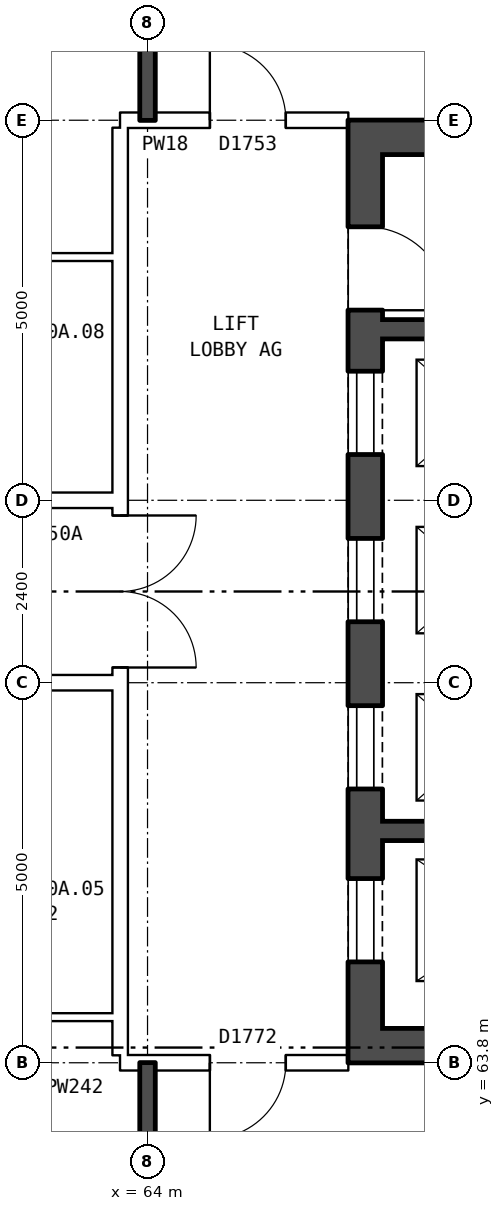
"""IFC4 building model, lengths in metres.
Left out: names, types, materials, properties, quantities, classifications, styles, units other than length and angle.
Written with IfcOpenShell. Run it as: python <this file> out.ifc"""

import sys

from ifc_helpers import new_model, si_unit, direction, frame, frame_2d, origin, place, context, subcontext, project, spatial, rectangle, extrude, element, fill, save


model = new_model("IFC4")
c1 = context("Model", 3, precision=1e-05, world=origin(), true_north=direction((0.0, 1.0)))
c2 = subcontext(c1, "Body", "Model", "MODEL_VIEW")
j1 = project(units=[si_unit("LENGTHUNIT", "METRE"), si_unit("PLANEANGLEUNIT", "RADIAN")], contexts=[c1])
p1 = place(None, origin())
s1 = spatial("IfcSite", under=j1, at=p1, CompositionType="ELEMENT")
p2 = place(p1, origin())
s2 = spatial("IfcBuilding", under=s1, at=p2, CompositionType="ELEMENT")
p3 = place(p2, frame((0.0, 0.0, 178.9)))
s3 = spatial("IfcBuildingStorey", under=s2, at=p3, CompositionType="ELEMENT", Elevation=178.9)
p4 = place(p3, frame((66.865, 63.8, 0.0), z_axis=(0.0, 0.0, 1.0), x_axis=(0.0, 1.0, 0.0)))
e1 = element("IfcWall", 1, at=p4, inside=s3, PredefinedType="SHEAR", context=c2, shape_type="SweptSolid", body=[
    extrude(rectangle(XDim=12.4, YDim=0.45, at=frame_2d((6.2, 0.0))), origin(), (0.0, 0.0, 1.0), 2.85),
])
p5 = place(p4, frame((1.325, 0.0, 0.0)))
e2 = element("IfcOpeningElement", 2, at=p5, cuts=e1, PredefinedType="OPENING", context=c2, shape_type="SweptSolid", body=[
    extrude(rectangle(XDim=1.1, YDim=2.1, at=frame_2d((0.55, 1.05))), frame((0.0, 0.235, 0.0), z_axis=(0.0, -1.0, 0.0), x_axis=(1.0, 0.0, 0.0)), (0.0, 0.0, 1.0), 0.47),
])
p6 = place(p4, frame((3.6, 0.0, 0.0)))
e3 = element("IfcOpeningElement", 3, at=p6, cuts=e1, PredefinedType="OPENING", context=c2, shape_type="SweptSolid", body=[
    extrude(rectangle(XDim=1.1, YDim=2.1, at=frame_2d((0.55, 1.05))), frame((0.0, 0.235, 0.0), z_axis=(0.0, -1.0, 0.0), x_axis=(1.0, 0.0, 0.0)), (0.0, 0.0, 1.0), 0.47),
])
p7 = place(p4, frame((5.8, 0.0, 0.0)))
e4 = element("IfcOpeningElement", 4, at=p7, cuts=e1, PredefinedType="OPENING", context=c2, shape_type="SweptSolid", body=[
    extrude(rectangle(XDim=1.1, YDim=2.1, at=frame_2d((0.55, 1.05))), frame((0.0, 0.235, 0.0), z_axis=(0.0, -1.0, 0.0), x_axis=(1.0, 0.0, 0.0)), (0.0, 0.0, 1.0), 0.47),
])
p8 = place(p4, frame((8.0, 0.0, 0.0)))
e5 = element("IfcOpeningElement", 5, at=p8, cuts=e1, PredefinedType="OPENING", context=c2, shape_type="SweptSolid", body=[
    extrude(rectangle(XDim=1.1, YDim=2.1, at=frame_2d((0.55, 1.05))), frame((0.0, 0.235, 0.0), z_axis=(0.0, -1.0, 0.0), x_axis=(1.0, 0.0, 0.0)), (0.0, 0.0, 1.0), 0.47),
])
p9 = place(p4, frame((9.9, 0.0, 0.0)))
e6 = element("IfcOpeningElement", 6, at=p9, cuts=e1, PredefinedType="OPENING", context=c2, shape_type="SweptSolid", body=[
    extrude(rectangle(XDim=1.1, YDim=2.1, at=frame_2d((0.55, 1.05))), frame((0.0, 0.235, 0.0), z_axis=(0.0, -1.0, 0.0), x_axis=(1.0, 0.0, 0.0)), (0.0, 0.0, 1.0), 0.47),
])
for number, where, z_axis, x_axis in (
    (7, (67.09, 64.025, 0.0), (0.0, 0.0, 1.0), (1.0, 0.0, 0.0)),
    (8, (67.09, 75.975, 0.0), (0.0, 0.0, 1.0), (1.0, 0.0, 0.0)),
):
    element("IfcWall", number, at=place(p3, frame(where, z_axis=z_axis, x_axis=x_axis)), inside=s3, PredefinedType="SHEAR", context=c2, shape_type="SweptSolid", body=[
        extrude(rectangle(XDim=8.1, YDim=0.45, at=frame_2d((4.05, 0.0))), origin(), (0.0, 0.0, 1.0), 2.85),
    ])
p10 = place(p3, frame((67.09, 66.85, 0.0), z_axis=(0.0, 0.0, 1.0), x_axis=(1.0, 0.0, 0.0)))
e9 = element("IfcWall", 9, at=p10, inside=s3, PredefinedType="SHEAR", context=c2, shape_type="SweptSolid", body=[
    extrude(rectangle(XDim=3.545, YDim=0.25, at=frame_2d((1.772, 0.0))), origin(), (0.0, 0.0, 1.0), 2.85),
])
p11 = place(p3, frame((67.09, 73.45, 0.0), z_axis=(0.0, 0.0, 1.0), x_axis=(1.0, 0.0, 0.0)))
e10 = element("IfcWall", 10, at=p11, inside=s3, PredefinedType="SHEAR", context=c2, shape_type="SweptSolid", body=[
    extrude(rectangle(XDim=2.475, YDim=0.25, at=frame_2d((1.237, 0.0))), origin(), (0.0, 0.0, 1.0), 2.85),
])
p12 = place(p3, frame((63.64, 63.9, 0.0), z_axis=(0.0, 0.0, 1.0), x_axis=(0.0, 1.0, 0.0)))
e11 = element("IfcWall", 11, at=p12, inside=s3, PredefinedType="PARTITIONING", context=c2, shape_type="SweptSolid", body=[
    extrude(rectangle(XDim=12.2, YDim=0.2, at=frame_2d((6.1, 0.0))), origin(), (0.0, 0.0, 1.0), 2.85),
])
p13 = place(p12, frame((5.1, 0.0, 0.0)))
e12 = element("IfcOpeningElement", 12, at=p13, cuts=e11, PredefinedType="OPENING", context=c2, shape_type="SweptSolid", body=[
    extrude(rectangle(XDim=2.0, YDim=2.1, at=frame_2d((1.0, 1.05))), frame((0.0, 0.11, 0.0), z_axis=(0.0, -1.0, 0.0), x_axis=(1.0, 0.0, 0.0)), (0.0, 0.0, 1.0), 0.22),
])
p14 = place(p3, frame((63.64, 63.8, 0.0), z_axis=(0.0, 0.0, 1.0), x_axis=(1.0, 0.0, 0.0)))
e13 = element("IfcWall", 13, at=p14, inside=s3, PredefinedType="PARTITIONING", context=c2, shape_type="SweptSolid", body=[
    extrude(rectangle(XDim=3.0, YDim=0.2, at=frame_2d((1.5, 0.0))), origin(), (0.0, 0.0, 1.0), 2.85),
])
p15 = place(p14, frame((1.18, 0.0, 0.0)))
e14 = element("IfcOpeningElement", 14, at=p15, cuts=e13, PredefinedType="OPENING", context=c2, shape_type="SweptSolid", body=[
    extrude(rectangle(XDim=1.0, YDim=2.1, at=frame_2d((0.5, 1.05))), frame((0.0, 0.11, 0.0), z_axis=(0.0, -1.0, 0.0), x_axis=(1.0, 0.0, 0.0)), (0.0, 0.0, 1.0), 0.22),
])
p16 = place(p3, frame((61.0, 64.4, 0.0), z_axis=(0.0, 0.0, 1.0), x_axis=(1.0, 0.0, 0.0)))
e15 = element("IfcWall", 15, at=p16, inside=s3, PredefinedType="PARTITIONING", context=c2, shape_type="SweptSolid", body=[
    extrude(rectangle(XDim=2.64, YDim=0.1, at=frame_2d((1.32, 0.0))), origin(), (0.0, 0.0, 1.0), 2.85),
])
p17 = place(p3, frame((44.36, 68.8, 0.0), z_axis=(0.0, 0.0, 1.0), x_axis=(1.0, 0.0, 0.0)))
e16 = element("IfcWall", 16, at=p17, inside=s3, PredefinedType="PARTITIONING", context=c2, shape_type="SweptSolid", body=[
    extrude(rectangle(XDim=19.28, YDim=0.2, at=frame_2d((9.64, 0.0))), origin(), (0.0, 0.0, 1.0), 2.85),
])
p18 = place(p17, frame((14.64, 0.0, 0.0)))
e17 = element("IfcOpeningElement", 17, at=p18, cuts=e16, PredefinedType="OPENING", context=c2, shape_type="SweptSolid", body=[
    extrude(rectangle(XDim=1.0, YDim=2.1, at=frame_2d((0.5, 1.05))), frame((0.0, 0.11, 0.0), z_axis=(0.0, -1.0, 0.0), x_axis=(1.0, 0.0, 0.0)), (0.0, 0.0, 1.0), 0.22),
])
p19 = place(p17, frame((11.64, 0.0, 0.0)))
e18 = element("IfcOpeningElement", 18, at=p19, cuts=e16, PredefinedType="OPENING", context=c2, shape_type="SweptSolid", body=[
    extrude(rectangle(XDim=1.0, YDim=2.1, at=frame_2d((0.5, 1.05))), frame((0.0, 0.11, 0.0), z_axis=(0.0, -1.0, 0.0), x_axis=(1.0, 0.0, 0.0)), (0.0, 0.0, 1.0), 0.22),
])
p20 = place(p17, frame((5.64, 0.0, 0.0)))
e19 = element("IfcOpeningElement", 19, at=p20, cuts=e16, PredefinedType="OPENING", context=c2, shape_type="SweptSolid", body=[
    extrude(rectangle(XDim=1.0, YDim=2.1, at=frame_2d((0.5, 1.05))), frame((0.0, 0.11, 0.0), z_axis=(0.0, -1.0, 0.0), x_axis=(1.0, 0.0, 0.0)), (0.0, 0.0, 1.0), 0.22),
])
p21 = place(p3, frame((44.36, 71.2, 0.0), z_axis=(0.0, 0.0, 1.0), x_axis=(1.0, 0.0, 0.0)))
e20 = element("IfcWall", 20, at=p21, inside=s3, PredefinedType="PARTITIONING", context=c2, shape_type="SweptSolid", body=[
    extrude(rectangle(XDim=19.28, YDim=0.2, at=frame_2d((9.64, 0.0))), origin(), (0.0, 0.0, 1.0), 2.85),
])
p22 = place(p21, frame((14.64, 0.0, 0.0)))
e21 = element("IfcOpeningElement", 21, at=p22, cuts=e20, PredefinedType="OPENING", context=c2, shape_type="SweptSolid", body=[
    extrude(rectangle(XDim=1.0, YDim=2.1, at=frame_2d((0.5, 1.05))), frame((0.0, 0.11, 0.0), z_axis=(0.0, -1.0, 0.0), x_axis=(1.0, 0.0, 0.0)), (0.0, 0.0, 1.0), 0.22),
])
p23 = place(p21, frame((5.64, 0.0, 0.0)))
e22 = element("IfcOpeningElement", 22, at=p23, cuts=e20, PredefinedType="OPENING", context=c2, shape_type="SweptSolid", body=[
    extrude(rectangle(XDim=1.0, YDim=2.1, at=frame_2d((0.5, 1.05))), frame((0.0, 0.11, 0.0), z_axis=(0.0, -1.0, 0.0), x_axis=(1.0, 0.0, 0.0)), (0.0, 0.0, 1.0), 0.22),
])
p24 = place(p3, frame((61.0, 74.4, 0.0), z_axis=(0.0, 0.0, 1.0), x_axis=(1.0, 0.0, 0.0)))
e23 = element("IfcWall", 23, at=p24, inside=s3, PredefinedType="PARTITIONING", context=c2, shape_type="SweptSolid", body=[
    extrude(rectangle(XDim=2.64, YDim=0.1, at=frame_2d((1.32, 0.0))), origin(), (0.0, 0.0, 1.0), 2.85),
])
p25 = place(p3, frame((63.64, 76.2, 0.0), z_axis=(0.0, 0.0, 1.0), x_axis=(1.0, 0.0, 0.0)))
e24 = element("IfcWall", 24, at=p25, inside=s3, PredefinedType="PARTITIONING", context=c2, shape_type="SweptSolid", body=[
    extrude(rectangle(XDim=3.0, YDim=0.2, at=frame_2d((1.5, 0.0))), origin(), (0.0, 0.0, 1.0), 2.85),
])
p26 = place(p25, frame((1.18, 0.0, 0.0)))
e25 = element("IfcOpeningElement", 25, at=p26, cuts=e24, PredefinedType="OPENING", context=c2, shape_type="SweptSolid", body=[
    extrude(rectangle(XDim=1.0, YDim=2.1, at=frame_2d((0.5, 1.05))), frame((0.0, 0.11, 0.0), z_axis=(0.0, -1.0, 0.0), x_axis=(1.0, 0.0, 0.0)), (0.0, 0.0, 1.0), 0.22),
])
for number, where, z_axis, x_axis in (
    (26, (64.0, 54.36, 0.0), (0.0, 0.0, 1.0), (0.0, 1.0, 0.0)),
    (27, (64.0, 76.2, 0.0), (0.0, 0.0, 1.0), (0.0, 1.0, 0.0)),
):
    element("IfcWall", number, at=place(p3, frame(where, z_axis=z_axis, x_axis=x_axis)), inside=s3, PredefinedType="SOLIDWALL", context=c2, shape_type="SweptSolid", body=[
        extrude(rectangle(XDim=9.44, YDim=0.2, at=frame_2d((4.72, 0.0))), origin(), (0.0, 0.0, 1.0), 2.85),
    ])
p27 = place(p5, origin())
e28 = element("IfcDoor", 28, at=p27, inside=s3, OperationType="DOUBLE_DOOR_SLIDING", PredefinedType="DOOR", context=c2, shape_type="SweptSolid", body=[
    extrude(rectangle(XDim=1.1, YDim=2.1, at=frame_2d((0.55, 1.05))), frame((0.0, -0.16, 0.0), z_axis=(0.0, -1.0, 0.0), x_axis=(1.0, 0.0, 0.0)), (0.0, 0.0, 1.0), 0.05),
])
fill(e2, e28)
p28 = place(p6, origin())
e29 = element("IfcDoor", 29, at=p28, inside=s3, OperationType="DOUBLE_DOOR_SLIDING", PredefinedType="DOOR", context=c2, shape_type="SweptSolid", body=[
    extrude(rectangle(XDim=1.1, YDim=2.1, at=frame_2d((0.55, 1.05))), frame((0.0, -0.16, 0.0), z_axis=(0.0, -1.0, 0.0), x_axis=(1.0, 0.0, 0.0)), (0.0, 0.0, 1.0), 0.05),
])
fill(e3, e29)
p29 = place(p7, origin())
e30 = element("IfcDoor", 30, at=p29, inside=s3, OperationType="DOUBLE_DOOR_SLIDING", PredefinedType="DOOR", context=c2, shape_type="SweptSolid", body=[
    extrude(rectangle(XDim=1.1, YDim=2.1, at=frame_2d((0.55, 1.05))), frame((0.0, -0.16, 0.0), z_axis=(0.0, -1.0, 0.0), x_axis=(1.0, 0.0, 0.0)), (0.0, 0.0, 1.0), 0.05),
])
fill(e4, e30)
p30 = place(p8, origin())
e31 = element("IfcDoor", 31, at=p30, inside=s3, OperationType="DOUBLE_DOOR_SLIDING", PredefinedType="DOOR", context=c2, shape_type="SweptSolid", body=[
    extrude(rectangle(XDim=1.1, YDim=2.1, at=frame_2d((0.55, 1.05))), frame((0.0, -0.16, 0.0), z_axis=(0.0, -1.0, 0.0), x_axis=(1.0, 0.0, 0.0)), (0.0, 0.0, 1.0), 0.05),
])
fill(e5, e31)
p31 = place(p9, frame((1.1, 0.0, 0.0), z_axis=(0.0, 0.0, 1.0), x_axis=(-1.0, 0.0, 0.0)))
e32 = element("IfcDoor", 32, at=p31, inside=s3, OperationType="SINGLE_SWING_RIGHT", PredefinedType="DOOR", context=c2, shape_type="SweptSolid", body=[
    extrude(rectangle(XDim=1.1, YDim=2.1, at=frame_2d((0.55, 1.05))), frame((0.0, 0.21, 0.0), z_axis=(0.0, -1.0, 0.0), x_axis=(1.0, 0.0, 0.0)), (0.0, 0.0, 1.0), 0.05),
])
fill(e6, e32)
p32 = place(p13, frame((2.0, 0.0, 0.0), z_axis=(0.0, 0.0, 1.0), x_axis=(-1.0, 0.0, 0.0)))
e33 = element("IfcDoor", 33, at=p32, inside=s3, OperationType="DOUBLE_DOOR_SINGLE_SWING", PredefinedType="DOOR", context=c2, shape_type="SweptSolid", body=[
    extrude(rectangle(XDim=2.0, YDim=2.1, at=frame_2d((1.0, 1.05))), frame((0.0, 0.025, 0.0), z_axis=(0.0, -1.0, 0.0), x_axis=(1.0, 0.0, 0.0)), (0.0, 0.0, 1.0), 0.05),
])
fill(e12, e33)
p33 = place(p15, frame((1.0, 0.0, 0.0), z_axis=(0.0, 0.0, 1.0), x_axis=(-1.0, 0.0, 0.0)))
e34 = element("IfcDoor", 34, at=p33, inside=s3, OperationType="SINGLE_SWING_RIGHT", PredefinedType="DOOR", context=c2, shape_type="SweptSolid", body=[
    extrude(rectangle(XDim=1.0, YDim=2.1, at=frame_2d((0.5, 1.05))), frame((0.0, 0.025, 0.0), z_axis=(0.0, -1.0, 0.0), x_axis=(1.0, 0.0, 0.0)), (0.0, 0.0, 1.0), 0.05),
])
fill(e14, e34)
p34 = place(p26, origin())
e35 = element("IfcDoor", 35, at=p34, inside=s3, OperationType="SINGLE_SWING_LEFT", PredefinedType="DOOR", context=c2, shape_type="SweptSolid", body=[
    extrude(rectangle(XDim=1.0, YDim=2.1, at=frame_2d((0.5, 1.05))), frame((0.0, 0.025, 0.0), z_axis=(0.0, -1.0, 0.0), x_axis=(1.0, 0.0, 0.0)), (0.0, 0.0, 1.0), 0.05),
])
fill(e25, e35)
save(model, sys.argv[1])
